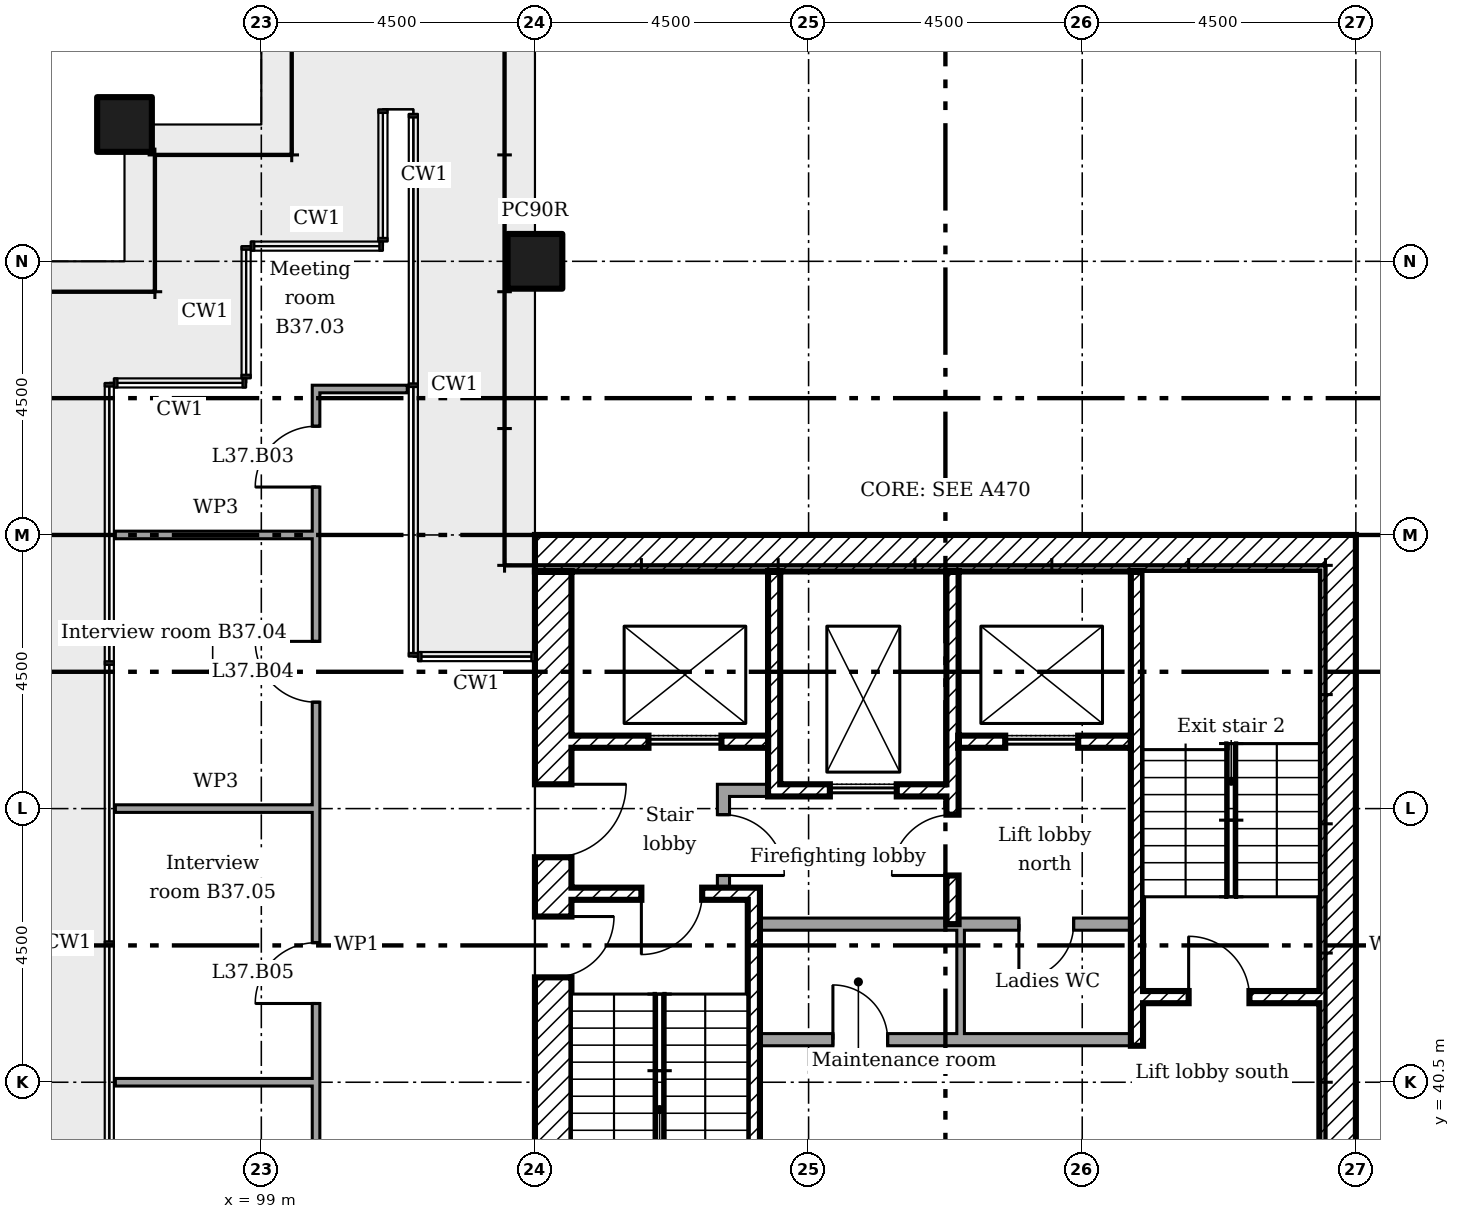
"""IFC4 building model, lengths in metres.
Left out: names, types, materials, properties, quantities, classifications, styles, units other than length and angle.
Written with IfcOpenShell. Run it as: python <this file> out.ifc"""

import sys

from ifc_helpers import new_model, si_unit, direction, frame, frame_2d, origin, origin_2d, place, context, subcontext, project, spatial, rectangle, extrude, element, fill, save


model = new_model("IFC4")
c1 = context("Model", 3, precision=1e-05, world=origin(), true_north=direction((0.0, 1.0)))
c2 = subcontext(c1, "Body", "Model", "MODEL_VIEW")
j1 = project(units=[si_unit("LENGTHUNIT", "METRE"), si_unit("PLANEANGLEUNIT", "RADIAN")], contexts=[c1])
p1 = place(None, origin())
s1 = spatial("IfcSite", under=j1, at=p1, CompositionType="ELEMENT")
p2 = place(p1, origin())
s2 = spatial("IfcBuilding", under=s1, at=p2, CompositionType="ELEMENT")
p3 = place(p2, frame((0.0, 0.0, 151.0)))
s3 = spatial("IfcBuildingStorey", under=s2, at=p3, CompositionType="ELEMENT", Elevation=151.0)
for number, where in (
    (1, (103.5, 54.0, 0.0)),
    (2, (96.75, 56.25, 0.0)),
):
    element("IfcColumn", number, at=place(p3, frame(where)), inside=s3, PredefinedType="COLUMN", context=c2, shape_type="SweptSolid", body=[
        extrude(rectangle(XDim=0.9, YDim=0.9, at=origin_2d()), origin(), (0.0, 0.0, 1.0), 3.6),
    ])
p4 = place(p3, frame((116.7, 36.0, 0.0), z_axis=(0.0, 0.0, 1.0), x_axis=(0.0, 1.0, 0.0)))
e3 = element("IfcWall", 3, at=p4, inside=s3, PredefinedType="SHEAR", context=c2, shape_type="SweptSolid", body=[
    extrude(rectangle(XDim=13.5, YDim=0.6, at=frame_2d((6.75, 0.0))), origin(), (0.0, 0.0, 1.0), 3.35),
])
p5 = place(p3, frame((103.5, 49.2, 0.0)))
e4 = element("IfcWall", 4, at=p5, inside=s3, PredefinedType="SHEAR", context=c2, shape_type="SweptSolid", body=[
    extrude(rectangle(XDim=12.9, YDim=0.6, at=frame_2d((6.45, 0.0))), origin(), (0.0, 0.0, 1.0), 3.35),
])
p6 = place(p3, frame((103.8, 36.6, 0.0), z_axis=(0.0, 0.0, 1.0), x_axis=(0.0, 1.0, 0.0)))
e5 = element("IfcWall", 5, at=p6, inside=s3, PredefinedType="SHEAR", context=c2, shape_type="SweptSolid", body=[
    extrude(rectangle(XDim=12.3, YDim=0.6, at=frame_2d((6.15, 0.0))), origin(), (0.0, 0.0, 1.0), 3.35),
])
p7 = place(p6, frame((7.6, 0.0, 0.0)))
e6 = element("IfcOpeningElement", 6, at=p7, cuts=e5, PredefinedType="OPENING", context=c2, shape_type="SweptSolid", body=[
    extrude(rectangle(XDim=1.2, YDim=2.1, at=frame_2d((0.6, 1.05))), frame((0.0, 0.31, 0.0), z_axis=(0.0, -1.0, 0.0), x_axis=(1.0, 0.0, 0.0)), (0.0, 0.0, 1.0), 0.62),
])
p8 = place(p6, frame((5.625, 0.0, 0.0)))
e7 = element("IfcOpeningElement", 7, at=p8, cuts=e5, PredefinedType="OPENING", context=c2, shape_type="SweptSolid", body=[
    extrude(rectangle(XDim=1.0, YDim=2.1, at=frame_2d((0.5, 1.05))), frame((0.0, 0.31, 0.0), z_axis=(0.0, -1.0, 0.0), x_axis=(1.0, 0.0, 0.0)), (0.0, 0.0, 1.0), 0.62),
])
p9 = place(p3, frame((107.433, 48.9, 0.0), z_axis=(0.0, 0.0, 1.0), x_axis=(0.0, -1.0, 0.0)))
e8 = element("IfcWall", 8, at=p9, inside=s3, PredefinedType="SHEAR", context=c2, shape_type="SweptSolid", body=[
    extrude(rectangle(XDim=3.7, YDim=0.2, at=frame_2d((1.85, 0.0))), origin(), (0.0, 0.0, 1.0), 3.35),
])
p10 = place(p3, frame((110.367, 48.9, 0.0), z_axis=(0.0, 0.0, 1.0), x_axis=(0.0, -1.0, 0.0)))
e9 = element("IfcWall", 9, at=p10, inside=s3, PredefinedType="SHEAR", context=c2, shape_type="SweptSolid", body=[
    extrude(rectangle(XDim=5.8, YDim=0.2, at=frame_2d((2.9, 0.0))), origin(), (0.0, 0.0, 1.0), 3.35),
])
p11 = place(p10, frame((4.0, 0.0, 0.0)))
e10 = element("IfcOpeningElement", 10, at=p11, cuts=e9, PredefinedType="OPENING", context=c2, shape_type="SweptSolid", body=[
    extrude(rectangle(XDim=1.0, YDim=2.1, at=frame_2d((0.5, 1.05))), frame((0.0, 0.11, 0.0), z_axis=(0.0, -1.0, 0.0), x_axis=(1.0, 0.0, 0.0)), (0.0, 0.0, 1.0), 0.22),
])
p12 = place(p3, frame((106.5, 45.3, 0.0)))
e11 = element("IfcWall", 11, at=p12, inside=s3, PredefinedType="PARTITIONING", context=c2, shape_type="SweptSolid", body=[
    extrude(rectangle(XDim=0.833, YDim=0.2, at=frame_2d((0.417, 0.0))), origin(), (0.0, 0.0, 1.0), 3.35),
])
p13 = place(p3, frame((106.6, 43.7, 0.0), z_axis=(0.0, 0.0, 1.0), x_axis=(0.0, 1.0, 0.0)))
e12 = element("IfcWall", 12, at=p13, inside=s3, PredefinedType="PARTITIONING", context=c2, shape_type="SweptSolid", body=[
    extrude(rectangle(XDim=1.5, YDim=0.2, at=frame_2d((0.75, 0.0))), origin(), (0.0, 0.0, 1.0), 3.35),
])
p14 = place(p13, frame((0.2, 0.0, 0.0)))
e13 = element("IfcOpeningElement", 13, at=p14, cuts=e12, PredefinedType="OPENING", context=c2, shape_type="SweptSolid", body=[
    extrude(rectangle(XDim=1.0, YDim=2.1, at=frame_2d((0.5, 1.05))), frame((0.0, 0.11, 0.0), z_axis=(0.0, -1.0, 0.0), x_axis=(1.0, 0.0, 0.0)), (0.0, 0.0, 1.0), 0.22),
])
p15 = place(p3, frame((104.1, 46.1, 0.0)))
e14 = element("IfcWall", 14, at=p15, inside=s3, PredefinedType="SHEAR", context=c2, shape_type="SweptSolid", body=[
    extrude(rectangle(XDim=3.233, YDim=0.2, at=frame_2d((1.617, 0.0))), origin(), (0.0, 0.0, 1.0), 3.35),
])
p16 = place(p15, frame((1.267, 0.0, 0.0)))
e15 = element("IfcOpeningElement", 15, at=p16, cuts=e14, PredefinedType="OPENING", context=c2, shape_type="SweptSolid", body=[
    extrude(rectangle(XDim=1.2, YDim=2.1, at=frame_2d((0.6, 1.05))), frame((0.0, 0.11, 0.0), z_axis=(0.0, -1.0, 0.0), x_axis=(1.0, 0.0, 0.0)), (0.0, 0.0, 1.0), 0.22),
])
p17 = place(p3, frame((110.467, 46.1, 0.0)))
e16 = element("IfcWall", 16, at=p17, inside=s3, PredefinedType="SHEAR", context=c2, shape_type="SweptSolid", body=[
    extrude(rectangle(XDim=2.833, YDim=0.2, at=frame_2d((1.417, 0.0))), origin(), (0.0, 0.0, 1.0), 3.35),
])
p18 = place(p17, frame((0.767, 0.0, 0.0)))
e17 = element("IfcOpeningElement", 17, at=p18, cuts=e16, PredefinedType="OPENING", context=c2, shape_type="SweptSolid", body=[
    extrude(rectangle(XDim=1.2, YDim=2.1, at=frame_2d((0.6, 1.05))), frame((0.0, 0.11, 0.0), z_axis=(0.0, -1.0, 0.0), x_axis=(1.0, 0.0, 0.0)), (0.0, 0.0, 1.0), 0.22),
])
p19 = place(p3, frame((107.533, 45.3, 0.0)))
e18 = element("IfcWall", 18, at=p19, inside=s3, PredefinedType="SHEAR", context=c2, shape_type="SweptSolid", body=[
    extrude(rectangle(XDim=2.733, YDim=0.2, at=frame_2d((1.367, 0.0))), origin(), (0.0, 0.0, 1.0), 3.35),
])
p20 = place(p19, frame((0.817, 0.0, 0.0)))
e19 = element("IfcOpeningElement", 19, at=p20, cuts=e18, PredefinedType="OPENING", context=c2, shape_type="SweptSolid", body=[
    extrude(rectangle(XDim=1.1, YDim=2.1, at=frame_2d((0.55, 1.05))), frame((0.0, 0.11, 0.0), z_axis=(0.0, -1.0, 0.0), x_axis=(1.0, 0.0, 0.0)), (0.0, 0.0, 1.0), 0.22),
])
p21 = place(p3, frame((107.1, 36.6, 0.0), z_axis=(0.0, 0.0, 1.0), x_axis=(0.0, 1.0, 0.0)))
e20 = element("IfcWall", 20, at=p21, inside=s3, PredefinedType="SHEAR", context=c2, shape_type="SweptSolid", body=[
    extrude(rectangle(XDim=7.1, YDim=0.2, at=frame_2d((3.55, 0.0))), origin(), (0.0, 0.0, 1.0), 3.35),
])
p22 = place(p3, frame((104.1, 43.6, 0.0)))
e21 = element("IfcWall", 21, at=p22, inside=s3, PredefinedType="SHEAR", context=c2, shape_type="SweptSolid", body=[
    extrude(rectangle(XDim=2.9, YDim=0.2, at=frame_2d((1.45, 0.0))), origin(), (0.0, 0.0, 1.0), 3.35),
])
p23 = place(p22, frame((1.15, 0.0, 0.0)))
e22 = element("IfcOpeningElement", 22, at=p23, cuts=e21, PredefinedType="OPENING", context=c2, shape_type="SweptSolid", body=[
    extrude(rectangle(XDim=1.0, YDim=2.1, at=frame_2d((0.5, 1.05))), frame((0.0, 0.11, 0.0), z_axis=(0.0, -1.0, 0.0), x_axis=(1.0, 0.0, 0.0)), (0.0, 0.0, 1.0), 0.22),
])
p24 = place(p3, frame((113.5, 41.9, 0.0)))
e23 = element("IfcWall", 23, at=p24, inside=s3, PredefinedType="SHEAR", context=c2, shape_type="SweptSolid", body=[
    extrude(rectangle(XDim=2.9, YDim=0.2, at=frame_2d((1.45, 0.0))), origin(), (0.0, 0.0, 1.0), 3.35),
])
p25 = place(p24, frame((0.75, 0.0, 0.0)))
e24 = element("IfcOpeningElement", 24, at=p25, cuts=e23, PredefinedType="OPENING", context=c2, shape_type="SweptSolid", body=[
    extrude(rectangle(XDim=1.0, YDim=2.1, at=frame_2d((0.5, 1.05))), frame((0.0, 0.11, 0.0), z_axis=(0.0, -1.0, 0.0), x_axis=(1.0, 0.0, 0.0)), (0.0, 0.0, 1.0), 0.22),
])
p26 = place(p3, frame((113.4, 41.1, 0.0), z_axis=(0.0, 0.0, 1.0), x_axis=(0.0, 1.0, 0.0)))
e25 = element("IfcWall", 25, at=p26, inside=s3, PredefinedType="SHEAR", context=c2, shape_type="SweptSolid", body=[
    extrude(rectangle(XDim=7.8, YDim=0.2, at=frame_2d((3.9, 0.0))), origin(), (0.0, 0.0, 1.0), 3.35),
])
p27 = place(p3, frame((107.2, 43.1, 0.0)))
e26 = element("IfcWall", 26, at=p27, inside=s3, PredefinedType="PARTITIONING", context=c2, shape_type="SweptSolid", body=[
    extrude(rectangle(XDim=6.1, YDim=0.2, at=frame_2d((3.05, 0.0))), origin(), (0.0, 0.0, 1.0), 3.35),
])
p28 = place(p27, frame((4.259, 0.0, 0.0)))
e27 = element("IfcOpeningElement", 27, at=p28, cuts=e26, PredefinedType="OPENING", context=c2, shape_type="SweptSolid", body=[
    extrude(rectangle(XDim=0.9, YDim=2.1, at=frame_2d((0.45, 1.05))), frame((0.0, 0.11, 0.0), z_axis=(0.0, -1.0, 0.0), x_axis=(1.0, 0.0, 0.0)), (0.0, 0.0, 1.0), 0.22),
])
p29 = place(p3, frame((107.2, 41.2, 0.0)))
e28 = element("IfcWall", 28, at=p29, inside=s3, PredefinedType="PARTITIONING", context=c2, shape_type="SweptSolid", body=[
    extrude(rectangle(XDim=6.1, YDim=0.2, at=frame_2d((3.05, 0.0))), origin(), (0.0, 0.0, 1.0), 3.35),
])
p30 = place(p29, frame((1.2, 0.0, 0.0)))
e29 = element("IfcOpeningElement", 29, at=p30, cuts=e28, PredefinedType="OPENING", context=c2, shape_type="SweptSolid", body=[
    extrude(rectangle(XDim=0.9, YDim=2.1, at=frame_2d((0.45, 1.05))), frame((0.0, 0.11, 0.0), z_axis=(0.0, -1.0, 0.0), x_axis=(1.0, 0.0, 0.0)), (0.0, 0.0, 1.0), 0.22),
])
p31 = place(p3, frame((110.5, 41.3, 0.0), z_axis=(0.0, 0.0, 1.0), x_axis=(0.0, 1.0, 0.0)))
e30 = element("IfcWall", 30, at=p31, inside=s3, PredefinedType="PARTITIONING", context=c2, shape_type="SweptSolid", body=[
    extrude(rectangle(XDim=1.7, YDim=0.125, at=frame_2d((0.85, 0.0))), origin(), (0.0, 0.0, 1.0), 3.35),
])
p32 = place(p3, frame((96.6, 40.5, 0.0)))
e31 = element("IfcWall", 31, at=p32, inside=s3, PredefinedType="PARTITIONING", context=c2, shape_type="SweptSolid", body=[
    extrude(rectangle(XDim=3.3, YDim=0.125, at=frame_2d((1.65, 0.0))), origin(), (0.0, 0.0, 1.0), 2.851),
])
for number, where in (
    (32, (96.6, 45.0, 0.0)),
    (33, (96.6, 49.5, 0.0)),
):
    element("IfcWall", number, at=place(p3, frame(where)), inside=s3, PredefinedType="MOVABLE", context=c2, shape_type="SweptSolid", body=[
        extrude(rectangle(XDim=3.3, YDim=0.125, at=frame_2d((1.65, 0.0))), origin(), (0.0, 0.0, 1.0), 2.851),
    ])
p33 = place(p3, frame((99.837, 51.9, 0.0)))
e34 = element("IfcWall", 34, at=p33, inside=s3, PredefinedType="PARTITIONING", context=c2, shape_type="SweptSolid", body=[
    extrude(rectangle(XDim=1.562, YDim=0.125, at=frame_2d((0.781, 0.0))), origin(), (0.0, 0.0, 1.0), 3.45),
])
p34 = place(p3, frame((99.9, 33.663, 0.0), z_axis=(0.0, 0.0, 1.0), x_axis=(0.0, 1.0, 0.0)))
e35 = element("IfcWall", 35, at=p34, inside=s3, PredefinedType="PARTITIONING", context=c2, shape_type="SweptSolid", body=[
    extrude(rectangle(XDim=18.175, YDim=0.125, at=frame_2d((9.087, 0.0))), origin(), (0.0, 0.0, 1.0), 3.45),
])
p35 = place(p34, frame((16.625, 0.0, 0.0)))
e36 = element("IfcOpeningElement", 36, at=p35, cuts=e35, PredefinedType="OPENING", context=c2, shape_type="SweptSolid", body=[
    extrude(rectangle(XDim=1.0, YDim=2.1, at=frame_2d((0.5, 1.05))), frame((0.0, 0.073, 0.0), z_axis=(0.0, -1.0, 0.0), x_axis=(1.0, 0.0, 0.0)), (0.0, 0.0, 1.0), 0.145),
])
p36 = place(p34, frame((13.087, 0.0, 0.0)))
e37 = element("IfcOpeningElement", 37, at=p36, cuts=e35, PredefinedType="OPENING", context=c2, shape_type="SweptSolid", body=[
    extrude(rectangle(XDim=1.0, YDim=2.1, at=frame_2d((0.5, 1.05))), frame((0.0, 0.073, 0.0), z_axis=(0.0, -1.0, 0.0), x_axis=(1.0, 0.0, 0.0)), (0.0, 0.0, 1.0), 0.145),
])
p37 = place(p34, frame((8.133, 0.0, 0.0)))
e38 = element("IfcOpeningElement", 38, at=p37, cuts=e35, PredefinedType="OPENING", context=c2, shape_type="SweptSolid", body=[
    extrude(rectangle(XDim=1.0, YDim=2.1, at=frame_2d((0.5, 1.05))), frame((0.0, 0.073, 0.0), z_axis=(0.0, -1.0, 0.0), x_axis=(1.0, 0.0, 0.0)), (0.0, 0.0, 1.0), 0.145),
])
p38 = place(p7, frame((1.2, 0.0, 0.0), x_axis=(-1.0, 0.0, 0.0)))
e39 = element("IfcDoor", 39, at=p38, inside=s3, OperationType="SINGLE_SWING_RIGHT", PredefinedType="DOOR", context=c2, shape_type="SweptSolid", body=[
    extrude(rectangle(XDim=1.2, YDim=2.1, at=frame_2d((0.6, 1.05))), frame((0.0, 0.025, 0.0), z_axis=(0.0, -1.0, 0.0), x_axis=(1.0, 0.0, 0.0)), (0.0, 0.0, 1.0), 0.05),
])
fill(e6, e39)
p39 = place(p23, frame((1.0, 0.0, 0.0), x_axis=(-1.0, 0.0, 0.0)))
e40 = element("IfcDoor", 40, at=p39, inside=s3, OperationType="SINGLE_SWING_LEFT", PredefinedType="DOOR", context=c2, shape_type="SweptSolid", body=[
    extrude(rectangle(XDim=1.0, YDim=2.1, at=frame_2d((0.5, 1.05))), frame((0.0, 0.025, 0.0), z_axis=(0.0, -1.0, 0.0), x_axis=(1.0, 0.0, 0.0)), (0.0, 0.0, 1.0), 0.05),
])
fill(e22, e40)
p40 = place(p8, frame((1.0, 0.0, 0.0), x_axis=(-1.0, 0.0, 0.0)))
e41 = element("IfcDoor", 41, at=p40, inside=s3, OperationType="SINGLE_SWING_RIGHT", PredefinedType="DOOR", context=c2, shape_type="SweptSolid", body=[
    extrude(rectangle(XDim=1.0, YDim=2.1, at=frame_2d((0.5, 1.05))), frame((0.0, 0.025, 0.0), z_axis=(0.0, -1.0, 0.0), x_axis=(1.0, 0.0, 0.0)), (0.0, 0.0, 1.0), 0.05),
])
fill(e7, e41)
p41 = place(p25, origin())
e42 = element("IfcDoor", 42, at=p41, inside=s3, OperationType="SINGLE_SWING_RIGHT", PredefinedType="DOOR", context=c2, shape_type="SweptSolid", body=[
    extrude(rectangle(XDim=1.0, YDim=2.1, at=frame_2d((0.5, 1.05))), frame((0.0, 0.025, 0.0), z_axis=(0.0, -1.0, 0.0), x_axis=(1.0, 0.0, 0.0)), (0.0, 0.0, 1.0), 0.05),
])
fill(e24, e42)
p42 = place(p11, frame((1.0, 0.0, 0.0), x_axis=(-1.0, 0.0, 0.0)))
e43 = element("IfcDoor", 43, at=p42, inside=s3, OperationType="SINGLE_SWING_RIGHT", PredefinedType="DOOR", context=c2, shape_type="SweptSolid", body=[
    extrude(rectangle(XDim=1.0, YDim=2.1, at=frame_2d((0.5, 1.05))), frame((0.0, 0.025, 0.0), z_axis=(0.0, -1.0, 0.0), x_axis=(1.0, 0.0, 0.0)), (0.0, 0.0, 1.0), 0.05),
])
fill(e10, e43)
p43 = place(p14, frame((1.0, 0.0, 0.0), x_axis=(-1.0, 0.0, 0.0)))
e44 = element("IfcDoor", 44, at=p43, inside=s3, OperationType="SINGLE_SWING_LEFT", PredefinedType="DOOR", context=c2, shape_type="SweptSolid", body=[
    extrude(rectangle(XDim=1.0, YDim=2.1, at=frame_2d((0.5, 1.05))), frame((0.0, 0.025, 0.0), z_axis=(0.0, -1.0, 0.0), x_axis=(1.0, 0.0, 0.0)), (0.0, 0.0, 1.0), 0.05),
])
fill(e13, e44)
p44 = place(p30, origin())
e45 = element("IfcDoor", 45, at=p44, inside=s3, OperationType="SINGLE_SWING_RIGHT", PredefinedType="DOOR", context=c2, shape_type="SweptSolid", body=[
    extrude(rectangle(XDim=0.9, YDim=2.1, at=frame_2d((0.45, 1.05))), frame((0.0, 0.025, 0.0), z_axis=(0.0, -1.0, 0.0), x_axis=(1.0, 0.0, 0.0)), (0.0, 0.0, 1.0), 0.05),
])
fill(e29, e45)
p45 = place(p28, frame((0.9, 0.0, 0.0), x_axis=(-1.0, 0.0, 0.0)))
e46 = element("IfcDoor", 46, at=p45, inside=s3, OperationType="SINGLE_SWING_LEFT", PredefinedType="DOOR", context=c2, shape_type="SweptSolid", body=[
    extrude(rectangle(XDim=0.9, YDim=2.1, at=frame_2d((0.45, 1.05))), frame((0.0, 0.025, 0.0), z_axis=(0.0, -1.0, 0.0), x_axis=(1.0, 0.0, 0.0)), (0.0, 0.0, 1.0), 0.05),
])
fill(e27, e46)
p46 = place(p20, origin())
e47 = element("IfcDoor", 47, at=p46, inside=s3, OperationType="SLIDING_TO_LEFT", PredefinedType="DOOR", context=c2, shape_type="SweptSolid", body=[
    extrude(rectangle(XDim=1.1, YDim=2.1, at=frame_2d((0.55, 1.05))), frame((0.0, 0.025, 0.0), z_axis=(0.0, -1.0, 0.0), x_axis=(1.0, 0.0, 0.0)), (0.0, 0.0, 1.0), 0.05),
])
fill(e19, e47)
p47 = place(p16, origin())
e48 = element("IfcDoor", 48, at=p47, inside=s3, OperationType="SLIDING_TO_LEFT", PredefinedType="DOOR", context=c2, shape_type="SweptSolid", body=[
    extrude(rectangle(XDim=1.2, YDim=2.1, at=frame_2d((0.6, 1.05))), frame((0.0, 0.025, 0.0), z_axis=(0.0, -1.0, 0.0), x_axis=(1.0, 0.0, 0.0)), (0.0, 0.0, 1.0), 0.05),
])
fill(e15, e48)
p48 = place(p18, origin())
e49 = element("IfcDoor", 49, at=p48, inside=s3, OperationType="SLIDING_TO_LEFT", PredefinedType="DOOR", context=c2, shape_type="SweptSolid", body=[
    extrude(rectangle(XDim=1.2, YDim=2.1, at=frame_2d((0.6, 1.05))), frame((0.0, 0.025, 0.0), z_axis=(0.0, -1.0, 0.0), x_axis=(1.0, 0.0, 0.0)), (0.0, 0.0, 1.0), 0.05),
])
fill(e17, e49)
p49 = place(p35, origin())
e50 = element("IfcDoor", 50, at=p49, inside=s3, OperationType="SINGLE_SWING_RIGHT", PredefinedType="DOOR", context=c2, shape_type="SweptSolid", body=[
    extrude(rectangle(XDim=1.0, YDim=2.1, at=frame_2d((0.5, 1.05))), frame((0.0, 0.025, 0.0), z_axis=(0.0, -1.0, 0.0), x_axis=(1.0, 0.0, 0.0)), (0.0, 0.0, 1.0), 0.05),
])
fill(e36, e50)
p50 = place(p36, origin())
e51 = element("IfcDoor", 51, at=p50, inside=s3, OperationType="SINGLE_SWING_LEFT", PredefinedType="DOOR", context=c2, shape_type="SweptSolid", body=[
    extrude(rectangle(XDim=1.0, YDim=2.1, at=frame_2d((0.5, 1.05))), frame((0.0, 0.025, 0.0), z_axis=(0.0, -1.0, 0.0), x_axis=(1.0, 0.0, 0.0)), (0.0, 0.0, 1.0), 0.05),
])
fill(e37, e51)
p51 = place(p37, origin())
e52 = element("IfcDoor", 52, at=p51, inside=s3, OperationType="SINGLE_SWING_RIGHT", PredefinedType="DOOR", context=c2, shape_type="SweptSolid", body=[
    extrude(rectangle(XDim=1.0, YDim=2.1, at=frame_2d((0.5, 1.05))), frame((0.0, 0.025, 0.0), z_axis=(0.0, -1.0, 0.0), x_axis=(1.0, 0.0, 0.0)), (0.0, 0.0, 1.0), 0.05),
])
fill(e38, e52)
save(model, sys.argv[1])
